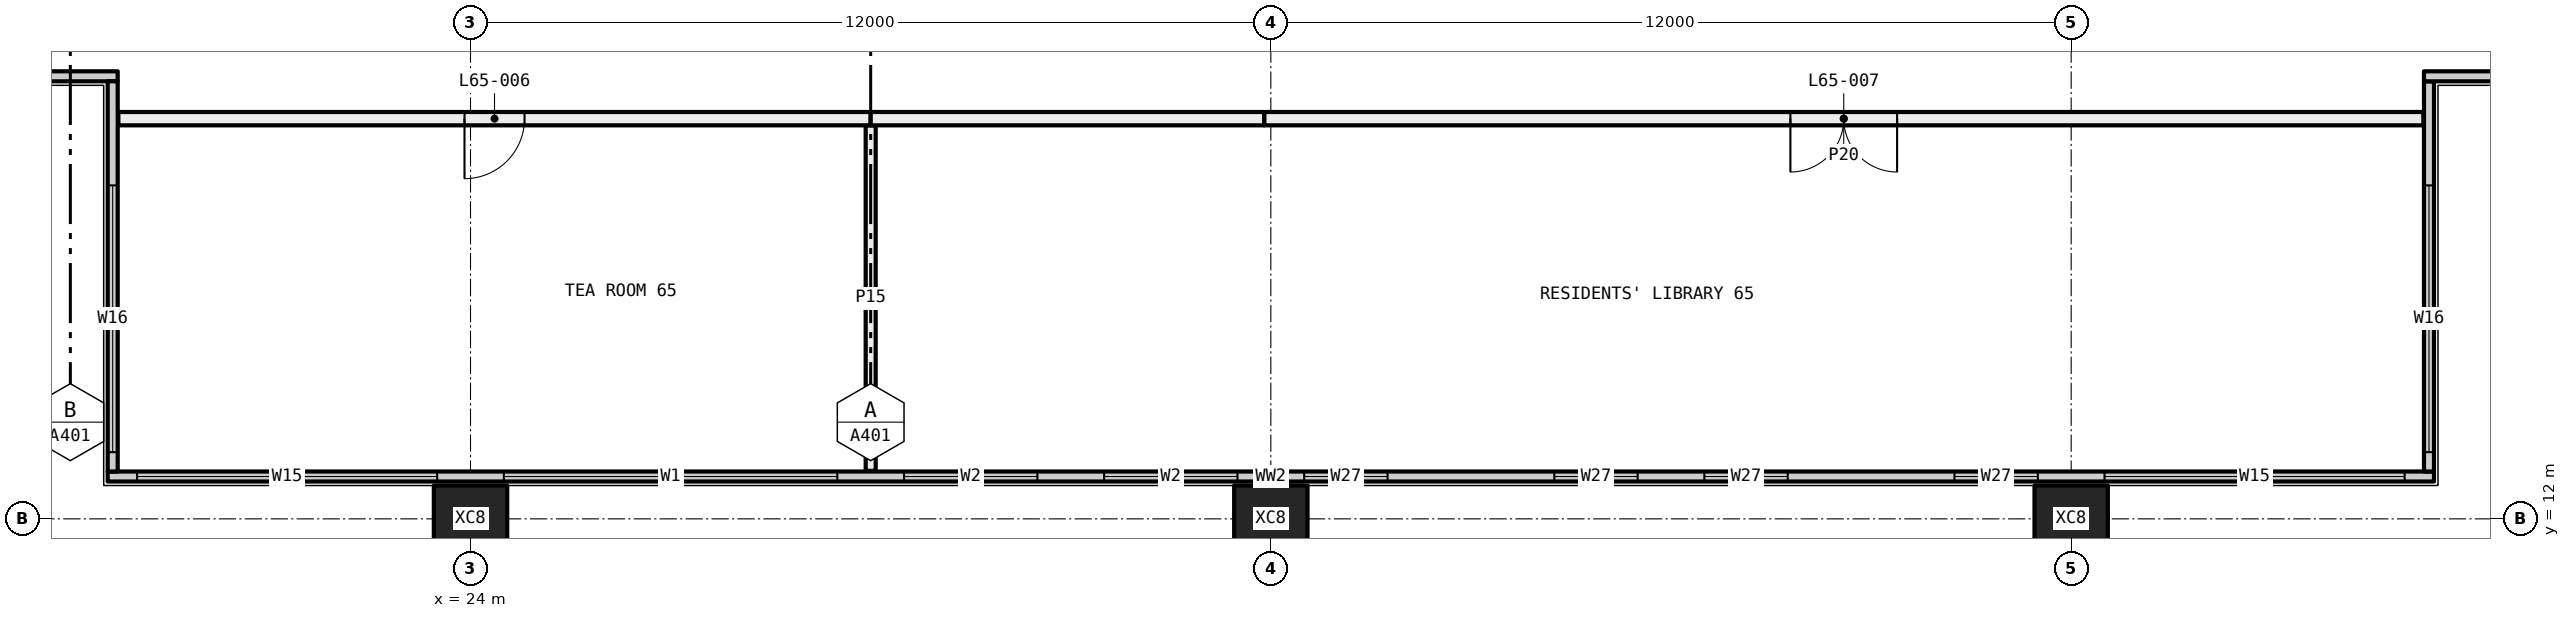
"""IFC4 building model, lengths in metres.
Left out: names, types, materials, properties, quantities, classifications, styles, units other than length and angle.
Written with IfcOpenShell. Run it as: python <this file> out.ifc"""

import sys

from ifc_helpers import new_model, si_unit, direction, frame, frame_2d, origin, origin_2d, place, context, subcontext, project, spatial, rectangle, hollow_rectangle, extrude, element, fill, save


model = new_model("IFC4")
c1 = context("Model", 3, precision=1e-05, world=origin(), true_north=direction((0.0, 1.0)))
c2 = subcontext(c1, "Body", "Model", "MODEL_VIEW")
j1 = project(units=[si_unit("LENGTHUNIT", "METRE"), si_unit("PLANEANGLEUNIT", "RADIAN")], contexts=[c1])
p1 = place(None, origin())
s1 = spatial("IfcSite", under=j1, at=p1, CompositionType="ELEMENT")
p2 = place(p1, origin())
s2 = spatial("IfcBuilding", under=s1, at=p2, CompositionType="ELEMENT")
p3 = place(p2, frame((0.0, 0.0, 242.1)))
s3 = spatial("IfcBuildingStorey", under=s2, at=p3, CompositionType="ELEMENT", Elevation=242.1)
for number, where, z_axis, x_axis in (
    (1, (24.0, 12.0, -0.4), (0.0, 0.0, 1.0), (1.0, 0.0, 0.0)),
    (2, (36.0, 12.0, -0.4), (0.0, 0.0, 1.0), (1.0, 0.0, 0.0)),
    (3, (48.0, 12.0, -0.4), (0.0, 0.0, 1.0), (1.0, 0.0, 0.0)),
):
    element("IfcColumn", number, at=place(p3, frame(where, z_axis=z_axis, x_axis=x_axis)), inside=s3, PredefinedType="COLUMN", context=c2, shape_type="SweptSolid", body=[
        extrude(hollow_rectangle(XDim=1.1, YDim=1.0, WallThickness=0.04, at=origin_2d()), origin(), (0.0, 0.0, 1.0), 3.45),
    ])
p4 = place(p3, frame((18.56, 12.635, 0.0), z_axis=(0.0, 0.0, 1.0), x_axis=(1.0, 0.0, 0.0)))
e4 = element("IfcWall", 4, at=p4, inside=s3, PredefinedType="ELEMENTEDWALL", context=c2, shape_type="SweptSolid", body=[
    extrude(rectangle(XDim=34.88, YDim=0.15, at=frame_2d((17.44, 0.0))), origin(), (0.0, 0.0, 1.0), 3.05),
])
p5 = place(p4, frame((0.44, 0.0, 0.45)))
e5 = element("IfcOpeningElement", 5, at=p5, cuts=e4, PredefinedType="OPENING", context=c2, shape_type="SweptSolid", body=[
    extrude(rectangle(XDim=4.5, YDim=2.55, at=frame_2d((2.25, 1.275))), frame((0.0, 0.085, 0.0), z_axis=(0.0, -1.0, 0.0), x_axis=(1.0, 0.0, 0.0)), (0.0, 0.0, 1.0), 0.17),
])
p6 = place(p4, frame((5.94, 0.0, 0.45)))
e6 = element("IfcOpeningElement", 6, at=p6, cuts=e4, PredefinedType="OPENING", context=c2, shape_type="SweptSolid", body=[
    extrude(rectangle(XDim=5.0, YDim=2.55, at=frame_2d((2.5, 1.275))), frame((0.0, 0.085, 0.0), z_axis=(0.0, -1.0, 0.0), x_axis=(1.0, 0.0, 0.0)), (0.0, 0.0, 1.0), 0.17),
])
p7 = place(p4, frame((11.94, 0.0, 0.45)))
e7 = element("IfcOpeningElement", 7, at=p7, cuts=e4, PredefinedType="OPENING", context=c2, shape_type="SweptSolid", body=[
    extrude(rectangle(XDim=2.0, YDim=2.55, at=frame_2d((1.0, 1.275))), frame((0.0, 0.085, 0.0), z_axis=(0.0, -1.0, 0.0), x_axis=(1.0, 0.0, 0.0)), (0.0, 0.0, 1.0), 0.17),
])
p8 = place(p4, frame((14.94, 0.0, 0.45)))
e8 = element("IfcOpeningElement", 8, at=p8, cuts=e4, PredefinedType="OPENING", context=c2, shape_type="SweptSolid", body=[
    extrude(rectangle(XDim=2.0, YDim=2.55, at=frame_2d((1.0, 1.275))), frame((0.0, 0.085, 0.0), z_axis=(0.0, -1.0, 0.0), x_axis=(1.0, 0.0, 0.0)), (0.0, 0.0, 1.0), 0.17),
])
p9 = place(p4, frame((17.94, 0.0, 0.45)))
e9 = element("IfcOpeningElement", 9, at=p9, cuts=e4, PredefinedType="OPENING", context=c2, shape_type="SweptSolid", body=[
    extrude(rectangle(XDim=1.25, YDim=2.55, at=frame_2d((0.625, 1.275))), frame((0.0, 0.085, 0.0), z_axis=(0.0, -1.0, 0.0), x_axis=(1.0, 0.0, 0.0)), (0.0, 0.0, 1.0), 0.17),
])
p10 = place(p4, frame((21.69, 0.0, 0.45)))
e10 = element("IfcOpeningElement", 10, at=p10, cuts=e4, PredefinedType="OPENING", context=c2, shape_type="SweptSolid", body=[
    extrude(rectangle(XDim=1.25, YDim=2.55, at=frame_2d((0.625, 1.275))), frame((0.0, 0.085, 0.0), z_axis=(0.0, -1.0, 0.0), x_axis=(1.0, 0.0, 0.0)), (0.0, 0.0, 1.0), 0.17),
])
p11 = place(p4, frame((23.94, 0.0, 0.45)))
e11 = element("IfcOpeningElement", 11, at=p11, cuts=e4, PredefinedType="OPENING", context=c2, shape_type="SweptSolid", body=[
    extrude(rectangle(XDim=1.25, YDim=2.55, at=frame_2d((0.625, 1.275))), frame((0.0, 0.085, 0.0), z_axis=(0.0, -1.0, 0.0), x_axis=(1.0, 0.0, 0.0)), (0.0, 0.0, 1.0), 0.17),
])
p12 = place(p4, frame((27.69, 0.0, 0.45)))
e12 = element("IfcOpeningElement", 12, at=p12, cuts=e4, PredefinedType="OPENING", context=c2, shape_type="SweptSolid", body=[
    extrude(rectangle(XDim=1.25, YDim=2.55, at=frame_2d((0.625, 1.275))), frame((0.0, 0.085, 0.0), z_axis=(0.0, -1.0, 0.0), x_axis=(1.0, 0.0, 0.0)), (0.0, 0.0, 1.0), 0.17),
])
p13 = place(p4, frame((29.94, 0.0, 0.45)))
e13 = element("IfcOpeningElement", 13, at=p13, cuts=e4, PredefinedType="OPENING", context=c2, shape_type="SweptSolid", body=[
    extrude(rectangle(XDim=4.5, YDim=2.55, at=frame_2d((2.25, 1.275))), frame((0.0, 0.085, 0.0), z_axis=(0.0, -1.0, 0.0), x_axis=(1.0, 0.0, 0.0)), (0.0, 0.0, 1.0), 0.17),
])
p14 = place(p3, frame((53.365, 12.71, 0.0), z_axis=(0.0, 0.0, 1.0), x_axis=(0.0, 1.0, 0.0)))
e14 = element("IfcWall", 14, at=p14, inside=s3, PredefinedType="ELEMENTEDWALL", context=c2, shape_type="SweptSolid", body=[
    extrude(rectangle(XDim=5.85, YDim=0.15, at=frame_2d((2.925, 0.0))), origin(), (0.0, 0.0, 1.0), 3.05),
])
p15 = place(p14, frame((0.29, 0.0, 0.45)))
e15 = element("IfcOpeningElement", 15, at=p15, cuts=e14, PredefinedType="OPENING", context=c2, shape_type="SweptSolid", body=[
    extrude(rectangle(XDim=4.0, YDim=2.55, at=frame_2d((2.0, 1.275))), frame((0.0, 0.085, 0.0), z_axis=(0.0, -1.0, 0.0), x_axis=(1.0, 0.0, 0.0)), (0.0, 0.0, 1.0), 0.17),
])
p16 = place(p3, frame((53.29, 18.635, 0.0), z_axis=(0.0, 0.0, 1.0), x_axis=(1.0, 0.0, 0.0)))
e16 = element("IfcWall", 16, at=p16, inside=s3, PredefinedType="ELEMENTEDWALL", context=c2, shape_type="SweptSolid", body=[
    extrude(rectangle(XDim=6.15, YDim=0.15, at=frame_2d((3.075, 0.0))), origin(), (0.0, 0.0, 1.0), 3.05),
])
p17 = place(p16, frame((1.71, 0.0, 0.45)))
e17 = element("IfcOpeningElement", 17, at=p17, cuts=e16, PredefinedType="OPENING", context=c2, shape_type="SweptSolid", body=[
    extrude(rectangle(XDim=4.0, YDim=2.55, at=frame_2d((2.0, 1.275))), frame((0.0, 0.085, 0.0), z_axis=(0.0, -1.0, 0.0), x_axis=(1.0, 0.0, 0.0)), (0.0, 0.0, 1.0), 0.17),
])
p18 = place(p3, frame((12.56, 18.635, 0.0), z_axis=(0.0, 0.0, 1.0), x_axis=(1.0, 0.0, 0.0)))
e18 = element("IfcWall", 18, at=p18, inside=s3, PredefinedType="ELEMENTEDWALL", context=c2, shape_type="SweptSolid", body=[
    extrude(rectangle(XDim=6.15, YDim=0.15, at=frame_2d((3.075, 0.0))), origin(), (0.0, 0.0, 1.0), 3.05),
])
p19 = place(p18, frame((0.44, 0.0, 0.45)))
e19 = element("IfcOpeningElement", 19, at=p19, cuts=e18, PredefinedType="OPENING", context=c2, shape_type="SweptSolid", body=[
    extrude(rectangle(XDim=4.0, YDim=2.55, at=frame_2d((2.0, 1.275))), frame((0.0, 0.085, 0.0), z_axis=(0.0, -1.0, 0.0), x_axis=(1.0, 0.0, 0.0)), (0.0, 0.0, 1.0), 0.17),
])
p20 = place(p3, frame((18.635, 12.71, 0.0), z_axis=(0.0, 0.0, 1.0), x_axis=(0.0, 1.0, 0.0)))
e20 = element("IfcWall", 20, at=p20, inside=s3, PredefinedType="ELEMENTEDWALL", context=c2, shape_type="SweptSolid", body=[
    extrude(rectangle(XDim=5.85, YDim=0.15, at=frame_2d((2.925, 0.0))), origin(), (0.0, 0.0, 1.0), 3.05),
])
p21 = place(p20, frame((0.29, 0.0, 0.45)))
e21 = element("IfcOpeningElement", 21, at=p21, cuts=e20, PredefinedType="OPENING", context=c2, shape_type="SweptSolid", body=[
    extrude(rectangle(XDim=4.0, YDim=2.55, at=frame_2d((2.0, 1.275))), frame((0.0, 0.085, 0.0), z_axis=(0.0, -1.0, 0.0), x_axis=(1.0, 0.0, 0.0)), (0.0, 0.0, 1.0), 0.17),
])
p22 = place(p3, frame((30.0, 12.72, 0.0), z_axis=(0.0, 0.0, 1.0), x_axis=(0.0, 1.0, 0.0)))
e22 = element("IfcWall", 22, at=p22, inside=s3, PredefinedType="PARTITIONING", context=c2, shape_type="SweptSolid", body=[
    extrude(rectangle(XDim=5.18, YDim=0.15, at=frame_2d((2.59, 0.0))), origin(), (0.0, 0.0, 1.0), 3.05),
])
p23 = place(p3, frame((30.0, 18.0, 0.0), z_axis=(0.0, 0.0, 1.0), x_axis=(-1.0, 0.0, 0.0)))
e23 = element("IfcWall", 23, at=p23, inside=s3, PredefinedType="PARTITIONING", context=c2, shape_type="SweptSolid", body=[
    extrude(rectangle(XDim=11.28, YDim=0.2, at=frame_2d((5.64, 0.0))), origin(), (0.0, 0.0, 1.0), 3.05),
])
p24 = place(p23, frame((5.19, 0.0, 0.0)))
e24 = element("IfcOpeningElement", 24, at=p24, cuts=e23, PredefinedType="OPENING", context=c2, shape_type="SweptSolid", body=[
    extrude(rectangle(XDim=0.9, YDim=2.1, at=frame_2d((0.45, 1.05))), frame((0.0, 0.11, 0.0), z_axis=(0.0, -1.0, 0.0), x_axis=(1.0, 0.0, 0.0)), (0.0, 0.0, 1.0), 0.22),
])
p25 = place(p3, frame((53.28, 18.0, 0.0), z_axis=(0.0, 0.0, 1.0), x_axis=(-1.0, 0.0, 0.0)))
e25 = element("IfcWall", 25, at=p25, inside=s3, PredefinedType="PARTITIONING", context=c2, shape_type="SweptSolid", body=[
    extrude(rectangle(XDim=17.38, YDim=0.2, at=frame_2d((8.69, 0.0))), origin(), (0.0, 0.0, 1.0), 2.45),
])
p26 = place(p25, frame((7.89, 0.0, 0.0)))
e26 = element("IfcOpeningElement", 26, at=p26, cuts=e25, PredefinedType="OPENING", context=c2, shape_type="SweptSolid", body=[
    extrude(rectangle(XDim=1.6, YDim=2.1, at=frame_2d((0.8, 1.05))), frame((0.0, 0.11, 0.0), z_axis=(0.0, -1.0, 0.0), x_axis=(1.0, 0.0, 0.0)), (0.0, 0.0, 1.0), 0.22),
])
p27 = place(p3, frame((35.9, 18.0, 0.0), z_axis=(0.0, 0.0, 1.0), x_axis=(-1.0, 0.0, 0.0)))
e27 = element("IfcWall", 27, at=p27, inside=s3, PredefinedType="PARTITIONING", context=c2, shape_type="SweptSolid", body=[
    extrude(rectangle(XDim=5.9, YDim=0.2, at=frame_2d((2.95, 0.0))), origin(), (0.0, 0.0, 1.0), 3.05),
])
p28 = place(p5, origin())
e28 = element("IfcWindow", 28, at=p28, inside=s3, PartitioningType="SINGLE_PANEL", PredefinedType="WINDOW", context=c2, shape_type="SweptSolid", body=[
    extrude(rectangle(XDim=4.5, YDim=2.55, at=frame_2d((2.25, 1.275))), frame((0.0, 0.03, 0.0), z_axis=(0.0, -1.0, 0.0), x_axis=(1.0, 0.0, 0.0)), (0.0, 0.0, 1.0), 0.06),
])
fill(e5, e28)
p29 = place(p6, origin())
e29 = element("IfcWindow", 29, at=p29, inside=s3, PartitioningType="SINGLE_PANEL", PredefinedType="WINDOW", context=c2, shape_type="SweptSolid", body=[
    extrude(rectangle(XDim=5.0, YDim=2.55, at=frame_2d((2.5, 1.275))), frame((0.0, 0.03, 0.0), z_axis=(0.0, -1.0, 0.0), x_axis=(1.0, 0.0, 0.0)), (0.0, 0.0, 1.0), 0.06),
])
fill(e6, e29)
p30 = place(p7, origin())
e30 = element("IfcWindow", 30, at=p30, inside=s3, PartitioningType="SINGLE_PANEL", PredefinedType="WINDOW", context=c2, shape_type="SweptSolid", body=[
    extrude(rectangle(XDim=2.0, YDim=2.55, at=frame_2d((1.0, 1.275))), frame((0.0, 0.03, 0.0), z_axis=(0.0, -1.0, 0.0), x_axis=(1.0, 0.0, 0.0)), (0.0, 0.0, 1.0), 0.06),
])
fill(e7, e30)
p31 = place(p8, origin())
e31 = element("IfcWindow", 31, at=p31, inside=s3, PartitioningType="SINGLE_PANEL", PredefinedType="WINDOW", context=c2, shape_type="SweptSolid", body=[
    extrude(rectangle(XDim=2.0, YDim=2.55, at=frame_2d((1.0, 1.275))), frame((0.0, 0.03, 0.0), z_axis=(0.0, -1.0, 0.0), x_axis=(1.0, 0.0, 0.0)), (0.0, 0.0, 1.0), 0.06),
])
fill(e8, e31)
p32 = place(p9, origin())
e32 = element("IfcWindow", 32, at=p32, inside=s3, PartitioningType="SINGLE_PANEL", PredefinedType="WINDOW", context=c2, shape_type="SweptSolid", body=[
    extrude(rectangle(XDim=1.25, YDim=2.55, at=frame_2d((0.625, 1.275))), frame((0.0, 0.03, 0.0), z_axis=(0.0, -1.0, 0.0), x_axis=(1.0, 0.0, 0.0)), (0.0, 0.0, 1.0), 0.06),
])
fill(e9, e32)
p33 = place(p10, origin())
e33 = element("IfcWindow", 33, at=p33, inside=s3, PartitioningType="SINGLE_PANEL", PredefinedType="WINDOW", context=c2, shape_type="SweptSolid", body=[
    extrude(rectangle(XDim=1.25, YDim=2.55, at=frame_2d((0.625, 1.275))), frame((0.0, 0.03, 0.0), z_axis=(0.0, -1.0, 0.0), x_axis=(1.0, 0.0, 0.0)), (0.0, 0.0, 1.0), 0.06),
])
fill(e10, e33)
p34 = place(p11, origin())
e34 = element("IfcWindow", 34, at=p34, inside=s3, PartitioningType="SINGLE_PANEL", PredefinedType="WINDOW", context=c2, shape_type="SweptSolid", body=[
    extrude(rectangle(XDim=1.25, YDim=2.55, at=frame_2d((0.625, 1.275))), frame((0.0, 0.03, 0.0), z_axis=(0.0, -1.0, 0.0), x_axis=(1.0, 0.0, 0.0)), (0.0, 0.0, 1.0), 0.06),
])
fill(e11, e34)
p35 = place(p12, origin())
e35 = element("IfcWindow", 35, at=p35, inside=s3, PartitioningType="SINGLE_PANEL", PredefinedType="WINDOW", context=c2, shape_type="SweptSolid", body=[
    extrude(rectangle(XDim=1.25, YDim=2.55, at=frame_2d((0.625, 1.275))), frame((0.0, 0.03, 0.0), z_axis=(0.0, -1.0, 0.0), x_axis=(1.0, 0.0, 0.0)), (0.0, 0.0, 1.0), 0.06),
])
fill(e12, e35)
p36 = place(p13, origin())
e36 = element("IfcWindow", 36, at=p36, inside=s3, PartitioningType="SINGLE_PANEL", PredefinedType="WINDOW", context=c2, shape_type="SweptSolid", body=[
    extrude(rectangle(XDim=4.5, YDim=2.55, at=frame_2d((2.25, 1.275))), frame((0.0, 0.03, 0.0), z_axis=(0.0, -1.0, 0.0), x_axis=(1.0, 0.0, 0.0)), (0.0, 0.0, 1.0), 0.06),
])
fill(e13, e36)
p37 = place(p15, origin())
e37 = element("IfcWindow", 37, at=p37, inside=s3, PartitioningType="SINGLE_PANEL", PredefinedType="WINDOW", context=c2, shape_type="SweptSolid", body=[
    extrude(rectangle(XDim=4.0, YDim=2.55, at=frame_2d((2.0, 1.275))), frame((0.0, 0.03, 0.0), z_axis=(0.0, -1.0, 0.0), x_axis=(1.0, 0.0, 0.0)), (0.0, 0.0, 1.0), 0.06),
])
fill(e15, e37)
p38 = place(p21, origin())
e38 = element("IfcWindow", 38, at=p38, inside=s3, PartitioningType="SINGLE_PANEL", PredefinedType="WINDOW", context=c2, shape_type="SweptSolid", body=[
    extrude(rectangle(XDim=4.0, YDim=2.55, at=frame_2d((2.0, 1.275))), frame((0.0, 0.03, 0.0), z_axis=(0.0, -1.0, 0.0), x_axis=(1.0, 0.0, 0.0)), (0.0, 0.0, 1.0), 0.06),
])
fill(e21, e38)
p39 = place(p24, origin())
e39 = element("IfcDoor", 39, at=p39, inside=s3, OperationType="SINGLE_SWING_LEFT", PredefinedType="DOOR", context=c2, shape_type="SweptSolid", body=[
    extrude(rectangle(XDim=0.9, YDim=2.1, at=frame_2d((0.45, 1.05))), frame((0.0, 0.025, 0.0), z_axis=(0.0, -1.0, 0.0), x_axis=(1.0, 0.0, 0.0)), (0.0, 0.0, 1.0), 0.05),
])
fill(e24, e39)
p40 = place(p26, origin())
e40 = element("IfcDoor", 40, at=p40, inside=s3, OperationType="DOUBLE_DOOR_SINGLE_SWING", PredefinedType="DOOR", context=c2, shape_type="SweptSolid", body=[
    extrude(rectangle(XDim=1.6, YDim=2.1, at=frame_2d((0.8, 1.05))), frame((0.0, 0.025, 0.0), z_axis=(0.0, -1.0, 0.0), x_axis=(1.0, 0.0, 0.0)), (0.0, 0.0, 1.0), 0.05),
])
fill(e26, e40)
save(model, sys.argv[1])
